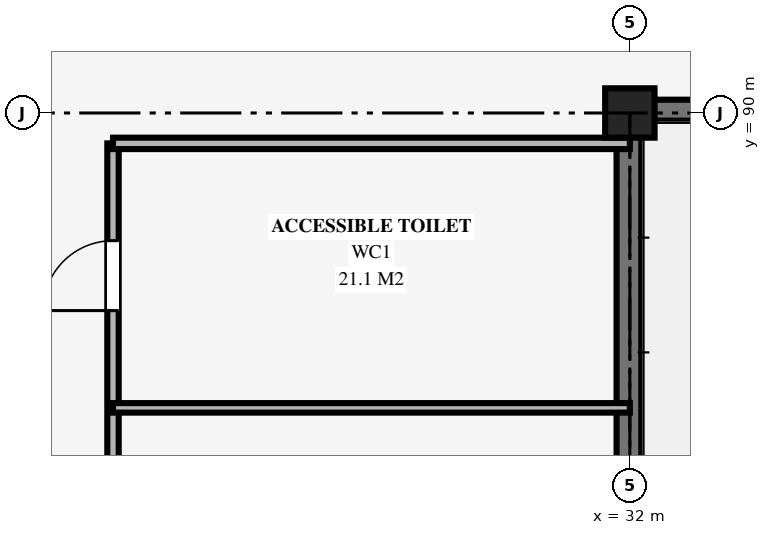
"""IFC4 building model, lengths in metres.
Left out: names, types, materials, properties, quantities, classifications, styles, units other than length and angle.
Written with IfcOpenShell. Run it as: python <this file> out.ifc"""

import sys

from ifc_helpers import new_model, si_unit, direction, frame, frame_2d, origin, origin_2d, place, context, subcontext, project, spatial, rectangle, extrude, element, fill, save


model = new_model("IFC4")
c1 = context("Model", 3, precision=1e-05, world=origin(), true_north=direction((0.0, 1.0)))
c2 = subcontext(c1, "Body", "Model", "MODEL_VIEW")
j1 = project(units=[si_unit("LENGTHUNIT", "METRE"), si_unit("PLANEANGLEUNIT", "RADIAN")], contexts=[c1])
p1 = place(None, origin())
s1 = spatial("IfcSite", under=j1, at=p1, CompositionType="ELEMENT")
p2 = place(p1, origin())
s2 = spatial("IfcBuilding", under=s1, at=p2, CompositionType="ELEMENT")
p3 = place(p2, origin())
s3 = spatial("IfcBuildingStorey", under=s2, at=p3, CompositionType="ELEMENT", Elevation=0.0)
p4 = place(p3, frame((32.0, 90.0, 0.0), z_axis=(0.0, 0.0, 1.0), x_axis=(1.0, 0.0, 0.0)))
e1 = element("IfcColumn", 1, at=p4, inside=s3, PredefinedType="COLUMN", context=c2, shape_type="SweptSolid", body=[
    extrude(rectangle(XDim=0.65, YDim=0.65, at=origin_2d()), origin(), (0.0, 0.0, 1.0), 5.24),
])
p5 = place(p3, frame((32.0, 90.0, 0.0), z_axis=(0.0, 0.0, 1.0), x_axis=(1.0, 0.0, 0.0)))
e2 = element("IfcWall", 2, at=p5, inside=s3, PredefinedType="SHEAR", context=c2, shape_type="SweptSolid", body=[
    extrude(rectangle(XDim=8.0, YDim=0.35, at=frame_2d((4.0, 0.0))), origin(), (0.0, 0.0, 1.0), 5.38),
])
p6 = place(p3, frame((32.0, 78.0, 0.0), z_axis=(0.0, 0.0, 1.0), x_axis=(0.0, 1.0, 0.0)))
e3 = element("IfcWall", 3, at=p6, inside=s3, PredefinedType="SHEAR", context=c2, shape_type="SweptSolid", body=[
    extrude(rectangle(XDim=12.0, YDim=0.35, at=frame_2d((6.0, 0.0))), origin(), (0.0, 0.0, 1.0), 5.38),
])
p7 = place(p3, frame((25.2, 78.0, 0.0), z_axis=(0.0, 0.0, 1.0), x_axis=(0.0, 1.0, 0.0)))
e4 = element("IfcWall", 4, at=p7, inside=s3, PredefinedType="PARTITIONING", context=c2, shape_type="SweptSolid", body=[
    extrude(rectangle(XDim=11.6, YDim=0.15, at=frame_2d((5.8, 0.0))), origin(), (0.0, 0.0, 1.0), 4.2),
])
p8 = place(p7, frame((1.754, 0.0, 0.0)))
e5 = element("IfcOpeningElement", 5, at=p8, cuts=e4, PredefinedType="OPENING", context=c2, shape_type="SweptSolid", body=[
    extrude(rectangle(XDim=0.9, YDim=2.1, at=frame_2d((0.45, 1.05))), frame((0.0, 0.085, 0.0), z_axis=(0.0, -1.0, 0.0), x_axis=(1.0, 0.0, 0.0)), (0.0, 0.0, 1.0), 0.17),
])
p9 = place(p7, frame((5.814, 0.0, 0.0)))
e6 = element("IfcOpeningElement", 6, at=p9, cuts=e4, PredefinedType="OPENING", context=c2, shape_type="SweptSolid", body=[
    extrude(rectangle(XDim=0.9, YDim=2.1, at=frame_2d((0.45, 1.05))), frame((0.0, 0.085, 0.0), z_axis=(0.0, -1.0, 0.0), x_axis=(1.0, 0.0, 0.0)), (0.0, 0.0, 1.0), 0.17),
])
p10 = place(p7, frame((9.4, 0.0, 0.0)))
e7 = element("IfcOpeningElement", 7, at=p10, cuts=e4, PredefinedType="OPENING", context=c2, shape_type="SweptSolid", body=[
    extrude(rectangle(XDim=0.92, YDim=2.1, at=frame_2d((0.46, 1.05))), frame((0.0, 0.085, 0.0), z_axis=(0.0, -1.0, 0.0), x_axis=(1.0, 0.0, 0.0)), (0.0, 0.0, 1.0), 0.17),
])
p11 = place(p3, frame((25.2, 89.6, 0.0), z_axis=(0.0, 0.0, 1.0), x_axis=(1.0, 0.0, 0.0)))
e8 = element("IfcWall", 8, at=p11, inside=s3, PredefinedType="PARTITIONING", context=c2, shape_type="SweptSolid", body=[
    extrude(rectangle(XDim=6.8, YDim=0.15, at=frame_2d((3.4, 0.0))), origin(), (0.0, 0.0, 1.0), 4.2),
])
p12 = place(p3, frame((25.2, 86.12, 0.0), z_axis=(0.0, 0.0, 1.0), x_axis=(1.0, 0.0, 0.0)))
e9 = element("IfcWall", 9, at=p12, inside=s3, PredefinedType="PARTITIONING", context=c2, shape_type="SweptSolid", body=[
    extrude(rectangle(XDim=6.8, YDim=0.125, at=frame_2d((3.4, 0.0))), origin(), (0.0, 0.0, 1.0), 4.2),
])
p13 = place(p10, origin())
e10 = element("IfcDoor", 10, at=p13, inside=s3, OperationType="SINGLE_SWING_LEFT", PredefinedType="DOOR", context=c2, shape_type="SweptSolid", body=[
    extrude(rectangle(XDim=0.92, YDim=2.1, at=frame_2d((0.46, 1.05))), frame((0.0, 0.025, 0.0), z_axis=(0.0, -1.0, 0.0), x_axis=(1.0, 0.0, 0.0)), (0.0, 0.0, 1.0), 0.05),
])
fill(e7, e10)
save(model, sys.argv[1])
